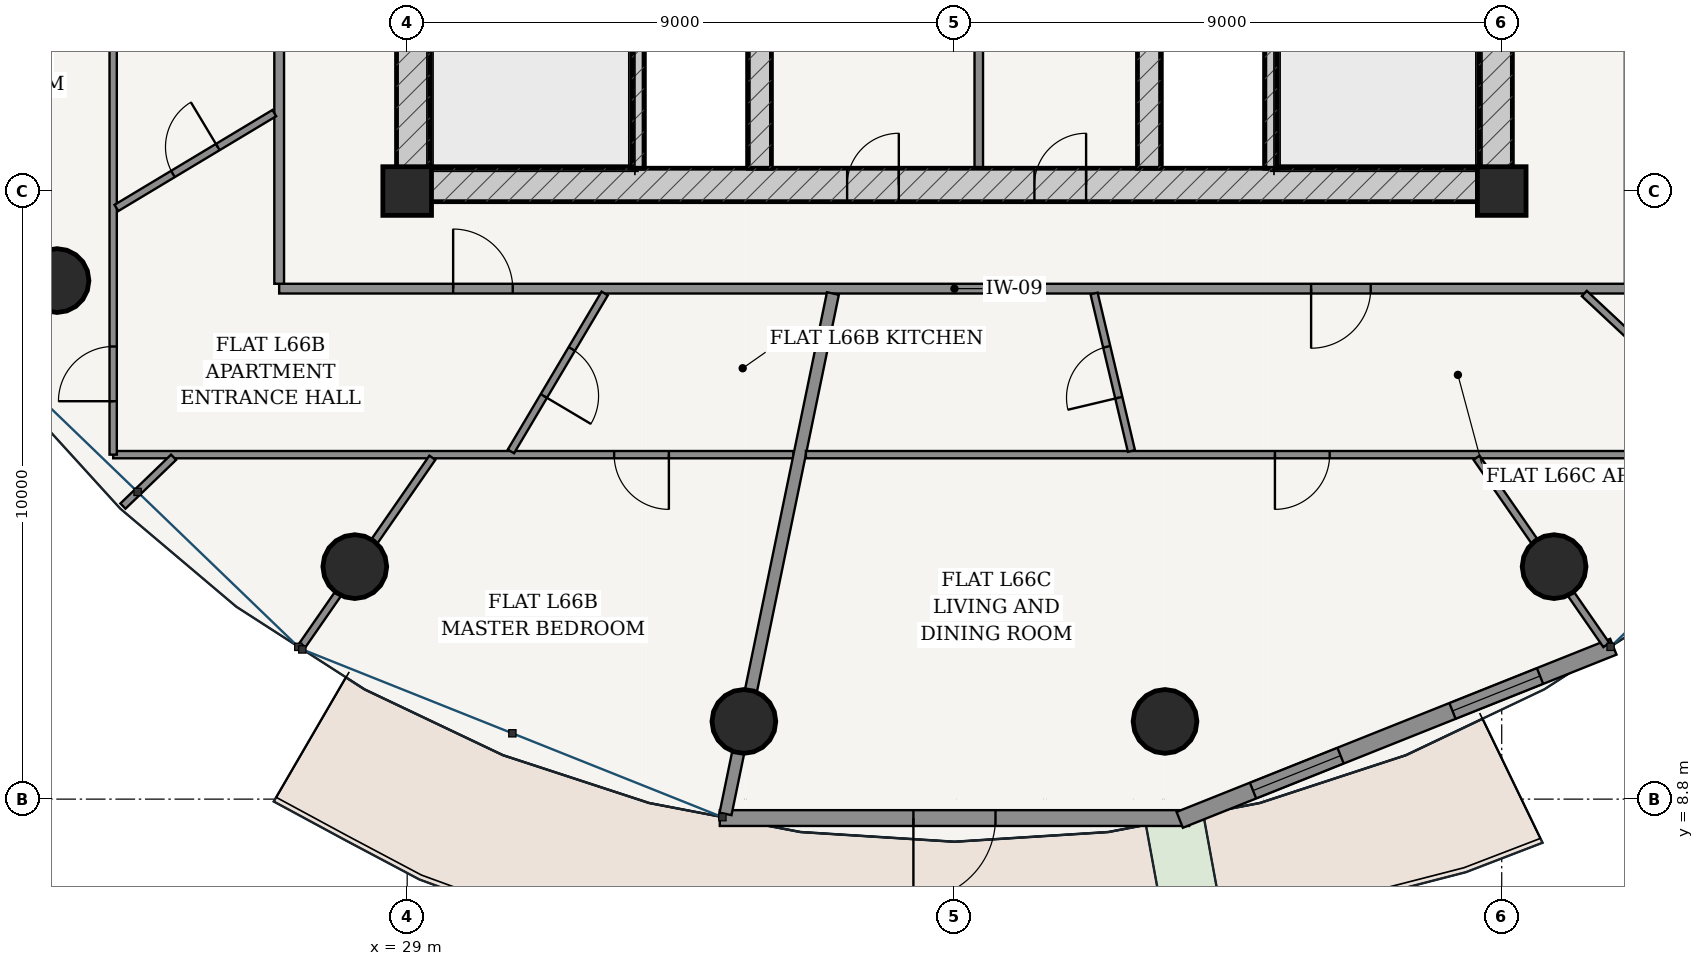
"""IFC4 building model, lengths in metres.
Left out: names, types, materials, properties, quantities, classifications, styles, units other than length and angle.
Written with IfcOpenShell. Run it as: python <this file> out.ifc"""

import sys

from ifc_helpers import new_model, si_unit, direction, frame, frame_2d, origin, origin_2d, place, context, subcontext, project, spatial, rectangle, hollow_circle, extrude, source, transform, mapped, element, fill, save


model = new_model("IFC4")
c1 = context("Model", 3, precision=1e-05, world=origin(), true_north=direction((-0.2419218956, 0.970295726276)))
c2 = subcontext(c1, "Body", "Model", "MODEL_VIEW")
j1 = project(units=[si_unit("LENGTHUNIT", "METRE"), si_unit("PLANEANGLEUNIT", "RADIAN")], contexts=[c1])
p1 = place(None, origin())
s1 = spatial("IfcSite", under=j1, at=p1, CompositionType="ELEMENT")
p2 = place(p1, origin())
s2 = spatial("IfcBuilding", under=s1, at=p2, CompositionType="ELEMENT")
p3 = place(p2, frame((0.0, 0.0, 251.95)))
s3 = spatial("IfcBuildingStorey", under=s2, at=p3, CompositionType="ELEMENT", Elevation=251.95)
for number, where, z_axis, x_axis in (
    (1, (29.0, 18.8, 0.0), (0.0, 0.0, 1.0), (1.0, 0.0, 0.0)),
    (2, (47.0, 18.8, 0.0), (0.0, 0.0, 1.0), (1.0, 0.0, 0.0)),
):
    element("IfcColumn", number, at=place(p3, frame(where, z_axis=z_axis, x_axis=x_axis)), inside=s3, PredefinedType="COLUMN", context=c2, shape_type="SweptSolid", body=[
        extrude(rectangle(XDim=0.8, YDim=0.8, at=origin_2d()), origin(), (0.0, 0.0, 1.0), 3.75),
    ])
p4 = place(p3, frame((28.825, 18.9, 0.0), z_axis=(0.0, 0.0, 1.0), x_axis=(1.0, 0.0, 0.0)))
e3 = element("IfcWall", 3, at=p4, inside=s3, PredefinedType="SHEAR", context=c2, shape_type="SweptSolid", body=[
    extrude(rectangle(XDim=18.35, YDim=0.55, at=frame_2d((9.175, 0.0))), origin(), (0.0, 0.0, 1.0), 3.49),
])
p5 = place(p4, frame((7.41, 0.0, 0.0)))
e4 = element("IfcOpeningElement", 4, at=p5, cuts=e3, PredefinedType="OPENING", context=c2, shape_type="SweptSolid", body=[
    extrude(rectangle(XDim=0.85, YDim=2.1, at=frame_2d((0.425, 1.05))), frame((0.0, 0.285, 0.0), z_axis=(0.0, -1.0, 0.0), x_axis=(1.0, 0.0, 0.0)), (0.0, 0.0, 1.0), 0.57),
])
p6 = place(p4, frame((10.49, 0.0, 0.0)))
e5 = element("IfcOpeningElement", 5, at=p6, cuts=e3, PredefinedType="OPENING", context=c2, shape_type="SweptSolid", body=[
    extrude(rectangle(XDim=0.85, YDim=2.1, at=frame_2d((0.425, 1.05))), frame((0.0, 0.285, 0.0), z_axis=(0.0, -1.0, 0.0), x_axis=(1.0, 0.0, 0.0)), (0.0, 0.0, 1.0), 0.57),
])
p7 = place(p3, frame((29.1, 19.175, 0.0), z_axis=(0.0, 0.0, 1.0), x_axis=(0.0, 1.0, 0.0)))
e6 = element("IfcWall", 6, at=p7, inside=s3, PredefinedType="SHEAR", context=c2, shape_type="SweptSolid", body=[
    extrude(rectangle(XDim=15.25, YDim=0.55, at=frame_2d((7.625, 0.0))), origin(), (0.0, 0.0, 1.0), 3.49),
])
p8 = place(p7, frame((9.875, 0.0, 0.0)))
e7 = element("IfcOpeningElement", 7, at=p8, cuts=e6, PredefinedType="OPENING", context=c2, shape_type="SweptSolid", body=[
    extrude(rectangle(XDim=1.5, YDim=2.2, at=frame_2d((0.75, 1.1))), frame((0.0, 0.285, 0.0), z_axis=(0.0, -1.0, 0.0), x_axis=(1.0, 0.0, 0.0)), (0.0, 0.0, 1.0), 0.57),
])
p9 = place(p3, frame((46.9, 19.175, 0.0), z_axis=(0.0, 0.0, 1.0), x_axis=(0.0, 1.0, 0.0)))
e8 = element("IfcWall", 8, at=p9, inside=s3, PredefinedType="SHEAR", context=c2, shape_type="SweptSolid", body=[
    extrude(rectangle(XDim=15.25, YDim=0.55, at=frame_2d((7.625, 0.0))), origin(), (0.0, 0.0, 1.0), 3.49),
])
p10 = place(p9, frame((9.875, 0.0, 0.0)))
e9 = element("IfcOpeningElement", 9, at=p10, cuts=e8, PredefinedType="OPENING", context=c2, shape_type="SweptSolid", body=[
    extrude(rectangle(XDim=1.5, YDim=2.2, at=frame_2d((0.75, 1.1))), frame((0.0, 0.285, 0.0), z_axis=(0.0, -1.0, 0.0), x_axis=(1.0, 0.0, 0.0)), (0.0, 0.0, 1.0), 0.57),
])
for number, where, z_axis, x_axis in (
    (10, (32.795, 19.175, 0.0), (0.0, 0.0, 1.0), (0.0, 1.0, 0.0)),
    (11, (43.205, 19.175, 0.0), (0.0, 0.0, 1.0), (0.0, 1.0, 0.0)),
):
    element("IfcWall", number, at=place(p3, frame(where, z_axis=z_axis, x_axis=x_axis)), inside=s3, PredefinedType="SOLIDWALL", context=c2, shape_type="SweptSolid", body=[
        extrude(rectangle(XDim=7.375, YDim=0.2, at=frame_2d((3.688, 0.0))), origin(), (0.0, 0.0, 1.0), 3.49),
    ])
p11 = place(p3, frame((34.8, 19.175, 0.0), z_axis=(0.0, 0.0, 1.0), x_axis=(0.0, 1.0, 0.0)))
e12 = element("IfcWall", 12, at=p11, inside=s3, PredefinedType="SHEAR", context=c2, shape_type="SweptSolid", body=[
    extrude(rectangle(XDim=15.25, YDim=0.38, at=frame_2d((7.625, 0.0))), origin(), (0.0, 0.0, 1.0), 3.49),
])
p12 = place(p11, frame((7.8, 0.0, 0.0)))
e13 = element("IfcOpeningElement", 13, at=p12, cuts=e12, PredefinedType="OPENING", context=c2, shape_type="SweptSolid", body=[
    extrude(rectangle(XDim=1.05, YDim=2.15, at=frame_2d((0.525, 1.075))), frame((0.0, 0.2, 0.0), z_axis=(0.0, -1.0, 0.0), x_axis=(1.0, 0.0, 0.0)), (0.0, 0.0, 1.0), 0.4),
])
p13 = place(p3, frame((41.2, 19.175, 0.0), z_axis=(0.0, 0.0, 1.0), x_axis=(0.0, 1.0, 0.0)))
e14 = element("IfcWall", 14, at=p13, inside=s3, PredefinedType="SHEAR", context=c2, shape_type="SweptSolid", body=[
    extrude(rectangle(XDim=15.25, YDim=0.38, at=frame_2d((7.625, 0.0))), origin(), (0.0, 0.0, 1.0), 3.49),
])
p14 = place(p13, frame((7.8, 0.0, 0.0)))
e15 = element("IfcOpeningElement", 15, at=p14, cuts=e14, PredefinedType="OPENING", context=c2, shape_type="SweptSolid", body=[
    extrude(rectangle(XDim=1.05, YDim=2.15, at=frame_2d((0.525, 1.075))), frame((0.0, 0.2, 0.0), z_axis=(0.0, -1.0, 0.0), x_axis=(1.0, 0.0, 0.0)), (0.0, 0.0, 1.0), 0.4),
])
for number, where, z_axis, x_axis in (
    (16, (23.241, 17.328, 0.0), (0.0, 0.0, 1.0), (1.0, 0.0, 0.0)),
    (17, (28.139, 12.624, 0.0), (0.0, 0.0, 1.0), (1.0, 0.0, 0.0)),
    (18, (34.537, 10.078, 0.0), (0.0, 0.0, 1.0), (1.0, 0.0, 0.0)),
    (19, (41.463, 10.078, 0.0), (0.0, 0.0, 1.0), (1.0, 0.0, 0.0)),
    (20, (47.861, 12.624, 0.0), (0.0, 0.0, 1.0), (1.0, 0.0, 0.0)),
):
    element("IfcColumn", number, at=place(p3, frame(where, z_axis=z_axis, x_axis=x_axis)), inside=s3, PredefinedType="COLUMN", context=c2, shape_type="SweptSolid", body=[
        extrude(hollow_circle(Radius=0.525, WallThickness=0.035, at=origin_2d()), origin(), (0.0, 0.0, 1.0), 3.75),
    ])
p15 = place(p3, frame((34.141, 8.489, 0.0), z_axis=(0.0, 0.0, 1.0), x_axis=(1.0, 0.0, 0.0)))
e21 = element("IfcWall", 21, at=p15, inside=s3, PredefinedType="SOLIDWALL", context=c2, shape_type="SweptSolid", body=[
    extrude(rectangle(XDim=7.718, YDim=0.26, at=frame_2d((3.859, 0.0))), origin(), (0.0, 0.0, 1.0), 3.49),
])
p16 = place(p15, frame((3.184, 0.0, 0.0)))
e22 = element("IfcOpeningElement", 22, at=p16, cuts=e21, PredefinedType="OPENING", context=c2, shape_type="SweptSolid", body=[
    extrude(rectangle(XDim=1.35, YDim=2.2, at=frame_2d((0.675, 1.1))), frame((0.0, 0.14, 0.0), z_axis=(0.0, -1.0, 0.0), x_axis=(1.0, 0.0, 0.0)), (0.0, 0.0, 1.0), 0.28),
])
p17 = place(p3, frame((41.705, 8.459, 0.0), z_axis=(0.0, 0.0, 1.0), x_axis=(0.92871332341, 0.370798547626, 0.0)))
e23 = element("IfcWall", 23, at=p17, inside=s3, PredefinedType="SOLIDWALL", context=c2, shape_type="SweptSolid", body=[
    extrude(rectangle(XDim=7.678, YDim=0.28, at=frame_2d((3.839, 0.0))), origin(), (0.0, 0.0, 1.0), 3.49),
])
p18 = place(p17, frame((1.298, 0.0, 0.85)))
e24 = element("IfcOpeningElement", 24, at=p18, cuts=e23, PredefinedType="OPENING", context=c2, shape_type="SweptSolid", body=[
    extrude(rectangle(XDim=1.55, YDim=1.95, at=frame_2d((0.775, 0.975))), frame((0.0, 0.15, 0.0), z_axis=(0.0, -1.0, 0.0), x_axis=(1.0, 0.0, 0.0)), (0.0, 0.0, 1.0), 0.3),
])
p19 = place(p17, frame((4.83, 0.0, 0.85)))
e25 = element("IfcOpeningElement", 25, at=p19, cuts=e23, PredefinedType="OPENING", context=c2, shape_type="SweptSolid", body=[
    extrude(rectangle(XDim=1.55, YDim=1.95, at=frame_2d((0.775, 0.975))), frame((0.0, 0.15, 0.0), z_axis=(0.0, -1.0, 0.0), x_axis=(1.0, 0.0, 0.0)), (0.0, 0.0, 1.0), 0.3),
])
p20 = place(p3, frame((38.4, 19.175, 0.0), z_axis=(0.0, 0.0, 1.0), x_axis=(0.0, 1.0, 0.0)))
e26 = element("IfcWall", 26, at=p20, inside=s3, PredefinedType="PARTITIONING", context=c2, shape_type="SweptSolid", body=[
    extrude(rectangle(XDim=4.465, YDim=0.14, at=frame_2d((2.232, 0.0))), origin(), (0.0, 0.0, 1.0), 3.49),
])
p21 = place(p3, frame((26.895, 17.195, 0.0), z_axis=(0.0, 0.0, 1.0), x_axis=(1.0, 0.0, 0.0)))
e27 = element("IfcWall", 27, at=p21, inside=s3, PredefinedType="PARTITIONING", context=c2, shape_type="SweptSolid", body=[
    extrude(rectangle(XDim=22.21, YDim=0.16, at=frame_2d((11.105, 0.0))), origin(), (0.0, 0.0, 1.0), 3.015),
])
p22 = place(p21, frame((2.861, 0.0, 0.0)))
e28 = element("IfcOpeningElement", 28, at=p22, cuts=e27, PredefinedType="OPENING", context=c2, shape_type="SweptSolid", body=[
    extrude(rectangle(XDim=0.98, YDim=2.2, at=frame_2d((0.49, 1.1))), frame((0.0, 0.09, 0.0), z_axis=(0.0, -1.0, 0.0), x_axis=(1.0, 0.0, 0.0)), (0.0, 0.0, 1.0), 0.18),
])
p23 = place(p21, frame((16.97, 0.0, 0.0)))
e29 = element("IfcOpeningElement", 29, at=p23, cuts=e27, PredefinedType="OPENING", context=c2, shape_type="SweptSolid", body=[
    extrude(rectangle(XDim=0.98, YDim=2.2, at=frame_2d((0.49, 1.1))), frame((0.0, 0.09, 0.0), z_axis=(0.0, -1.0, 0.0), x_axis=(1.0, 0.0, 0.0)), (0.0, 0.0, 1.0), 0.18),
])
for number, where, z_axis, x_axis in (
    (30, (26.895, 17.275, 0.0), (0.0, 0.0, 1.0), (0.0, 1.0, 0.0)),
    (31, (49.105, 17.275, 0.0), (0.0, 0.0, 1.0), (0.0, 1.0, 0.0)),
):
    element("IfcWall", number, at=place(p3, frame(where, z_axis=z_axis, x_axis=x_axis)), inside=s3, PredefinedType="PARTITIONING", context=c2, shape_type="SweptSolid", body=[
        extrude(rectangle(XDim=13.925, YDim=0.16, at=frame_2d((6.962, 0.0))), origin(), (0.0, 0.0, 1.0), 3.015),
    ])
p24 = place(p3, frame((35.353, 14.465, 0.0), z_axis=(0.0, 0.0, 1.0), x_axis=(-1.0, 0.0, 0.0)))
e32 = element("IfcWall", 32, at=p24, inside=s3, PredefinedType="PARTITIONING", context=c2, shape_type="SweptSolid", body=[
    extrude(rectangle(XDim=11.188, YDim=0.12, at=frame_2d((5.594, 0.0))), origin(), (0.0, 0.0, 1.0), 3.015),
])
p25 = place(p24, frame((2.049, 0.0, 0.0)))
e33 = element("IfcOpeningElement", 33, at=p25, cuts=e32, PredefinedType="OPENING", context=c2, shape_type="SweptSolid", body=[
    extrude(rectangle(XDim=0.9, YDim=2.15, at=frame_2d((0.45, 1.075))), frame((0.0, 0.07, 0.0), z_axis=(0.0, -1.0, 0.0), x_axis=(1.0, 0.0, 0.0)), (0.0, 0.0, 1.0), 0.14),
])
p26 = place(p3, frame((24.165, 14.465, 0.0), z_axis=(0.0, 0.0, 1.0), x_axis=(0.0, 1.0, 0.0)))
e34 = element("IfcWall", 34, at=p26, inside=s3, PredefinedType="PARTITIONING", context=c2, shape_type="SweptSolid", body=[
    extrude(rectangle(XDim=9.58, YDim=0.12, at=frame_2d((4.79, 0.0))), origin(), (0.0, 0.0, 1.0), 3.015),
])
p27 = place(p26, frame((0.879, 0.0, 0.0)))
e35 = element("IfcOpeningElement", 35, at=p27, cuts=e34, PredefinedType="OPENING", context=c2, shape_type="SweptSolid", body=[
    extrude(rectangle(XDim=0.9, YDim=2.15, at=frame_2d((0.45, 1.075))), frame((0.0, 0.07, 0.0), z_axis=(0.0, -1.0, 0.0), x_axis=(1.0, 0.0, 0.0)), (0.0, 0.0, 1.0), 0.14),
])
p28 = place(p3, frame((25.159, 14.422, 0.0), z_axis=(0.0, 0.0, 1.0), x_axis=(-0.720070222664, -0.693901199331, 0.0)))
e36 = element("IfcWall", 36, at=p28, inside=s3, PredefinedType="PARTITIONING", context=c2, shape_type="SweptSolid", body=[
    extrude(rectangle(XDim=1.157, YDim=0.12, at=frame_2d((0.578, 0.0))), origin(), (0.0, 0.0, 1.0), 3.49),
])
p29 = place(p3, frame((29.414, 14.414, 0.0), z_axis=(0.0, 0.0, 1.0), x_axis=(-0.569657021681, -0.821882520589, 0.0)))
e37 = element("IfcWall", 37, at=p29, inside=s3, PredefinedType="PARTITIONING", context=c2, shape_type="SweptSolid", body=[
    extrude(rectangle(XDim=3.748, YDim=0.12, at=frame_2d((1.874, 0.0))), origin(), (0.0, 0.0, 1.0), 3.015),
])
p30 = place(p3, frame((26.815, 20.082, 0.0), z_axis=(0.0, 0.0, 1.0), x_axis=(-0.857265264382, -0.514875000834, 0.0)))
e38 = element("IfcWall", 38, at=p30, inside=s3, PredefinedType="PARTITIONING", context=c2, shape_type="SweptSolid", body=[
    extrude(rectangle(XDim=3.029, YDim=0.12, at=frame_2d((1.515, 0.0))), origin(), (0.0, 0.0, 1.0), 3.209),
])
p31 = place(p30, frame((1.085, 0.0, 0.0)))
e39 = element("IfcOpeningElement", 39, at=p31, cuts=e38, PredefinedType="OPENING", context=c2, shape_type="SweptSolid", body=[
    extrude(rectangle(XDim=0.86, YDim=2.15, at=frame_2d((0.43, 1.075))), frame((0.0, 0.07, 0.0), z_axis=(0.0, -1.0, 0.0), x_axis=(1.0, 0.0, 0.0)), (0.0, 0.0, 1.0), 0.14),
])
p32 = place(p3, frame((32.248, 17.115, 0.0), z_axis=(0.0, 0.0, 1.0), x_axis=(-0.510591051721, -0.85982369001, 0.0)))
e40 = element("IfcWall", 40, at=p32, inside=s3, PredefinedType="PARTITIONING", context=c2, shape_type="SweptSolid", body=[
    extrude(rectangle(XDim=3.02, YDim=0.12, at=frame_2d((1.51, 0.0))), origin(), (0.0, 0.0, 1.0), 3.209),
])
p33 = place(p32, frame((1.06, 0.0, 0.0)))
e41 = element("IfcOpeningElement", 41, at=p33, cuts=e40, PredefinedType="OPENING", context=c2, shape_type="SweptSolid", body=[
    extrude(rectangle(XDim=0.9, YDim=2.15, at=frame_2d((0.45, 1.075))), frame((0.0, 0.07, 0.0), z_axis=(0.0, -1.0, 0.0), x_axis=(1.0, 0.0, 0.0)), (0.0, 0.0, 1.0), 0.14),
])
p34 = place(p3, frame((36.001, 17.115, 0.0), z_axis=(0.0, 0.0, 1.0), x_axis=(-0.202108543081, -0.979363128167, 0.0)))
e42 = element("IfcWall", 42, at=p34, inside=s3, PredefinedType="PARTITIONING", context=c2, shape_type="SweptSolid", body=[
    extrude(rectangle(XDim=8.739, YDim=0.2, at=frame_2d((4.369, 0.0))), origin(), (0.0, 0.0, 1.0), 3.015),
])
p35 = place(p3, frame((51.835, 14.465, 0.0), z_axis=(0.0, 0.0, 1.0), x_axis=(-1.0, 0.0, 0.0)))
e43 = element("IfcWall", 43, at=p35, inside=s3, PredefinedType="PARTITIONING", context=c2, shape_type="SweptSolid", body=[
    extrude(rectangle(XDim=16.278, YDim=0.12, at=frame_2d((8.139, 0.0))), origin(), (0.0, 0.0, 1.0), 3.015),
])
p36 = place(p35, frame((7.665, 0.0, 0.0)))
e44 = element("IfcOpeningElement", 44, at=p36, cuts=e43, PredefinedType="OPENING", context=c2, shape_type="SweptSolid", body=[
    extrude(rectangle(XDim=0.9, YDim=2.15, at=frame_2d((0.45, 1.075))), frame((0.0, 0.07, 0.0), z_axis=(0.0, -1.0, 0.0), x_axis=(1.0, 0.0, 0.0)), (0.0, 0.0, 1.0), 0.14),
])
p37 = place(p3, frame((46.586, 14.414, 0.0), z_axis=(0.0, 0.0, 1.0), x_axis=(0.569657021681, -0.821882520589, 0.0)))
e45 = element("IfcWall", 45, at=p37, inside=s3, PredefinedType="PARTITIONING", context=c2, shape_type="SweptSolid", body=[
    extrude(rectangle(XDim=3.748, YDim=0.12, at=frame_2d((1.874, 0.0))), origin(), (0.0, 0.0, 1.0), 3.015),
])
p38 = place(p3, frame((40.296, 17.115, 0.0), z_axis=(0.0, 0.0, 1.0), x_axis=(0.230710960444, -0.973022328999, 0.0)))
e46 = element("IfcWall", 46, at=p38, inside=s3, PredefinedType="PARTITIONING", context=c2, shape_type="SweptSolid", body=[
    extrude(rectangle(XDim=2.661, YDim=0.12, at=frame_2d((1.331, 0.0))), origin(), (0.0, 0.0, 1.0), 3.49),
])
p39 = place(p38, frame((0.901, 0.0, 0.0)))
e47 = element("IfcOpeningElement", 47, at=p39, cuts=e46, PredefinedType="OPENING", context=c2, shape_type="SweptSolid", body=[
    extrude(rectangle(XDim=0.86, YDim=2.15, at=frame_2d((0.43, 1.075))), frame((0.0, 0.07, 0.0), z_axis=(0.0, -1.0, 0.0), x_axis=(1.0, 0.0, 0.0)), (0.0, 0.0, 1.0), 0.14),
])
p40 = place(p3, frame((48.358, 17.115, 0.0), z_axis=(0.0, 0.0, 1.0), x_axis=(0.730431927487, -0.682985504464, 0.0)))
e48 = element("IfcWall", 48, at=p40, inside=s3, PredefinedType="PARTITIONING", context=c2, shape_type="SweptSolid", body=[
    extrude(rectangle(XDim=3.818, YDim=0.12, at=frame_2d((1.909, 0.0))), origin(), (0.0, 0.0, 1.0), 3.121),
])
p41 = place(p40, frame((1.459, 0.0, 0.0)))
e49 = element("IfcOpeningElement", 49, at=p41, cuts=e48, PredefinedType="OPENING", context=c2, shape_type="SweptSolid", body=[
    extrude(rectangle(XDim=0.9, YDim=2.15, at=frame_2d((0.45, 1.075))), frame((0.0, 0.07, 0.0), z_axis=(0.0, -1.0, 0.0), x_axis=(1.0, 0.0, 0.0)), (0.0, 0.0, 1.0), 0.14),
])
m1 = source(origin(), c2, "Body", "SweptSolid", [
    extrude(rectangle(XDim=1.35, YDim=2.2, at=frame_2d((0.675, 1.1))), frame((0.0, 0.025, 0.0), z_axis=(0.0, -1.0, 0.0), x_axis=(1.0, 0.0, 0.0)), (0.0, 0.0, 1.0), 0.05),
])
p42 = place(p16, frame((1.35, 0.0, 0.0), z_axis=(0.0, 0.0, 1.0), x_axis=(-1.0, 0.0, 0.0)))
e50 = element("IfcDoor", 50, at=p42, inside=s3, OperationType="SINGLE_SWING_RIGHT", PredefinedType="DOOR", context=c2, shape_type="MappedRepresentation", body=[
    mapped(m1, transform((0.0, 0.0, 0.0), scale=1.0)),
])
fill(e22, e50)
m2 = source(origin(), c2, "Body", "SweptSolid", [
    extrude(rectangle(XDim=1.55, YDim=1.95, at=frame_2d((0.775, 0.975))), frame((0.0, 0.03, 0.0), z_axis=(0.0, -1.0, 0.0), x_axis=(1.0, 0.0, 0.0)), (0.0, 0.0, 1.0), 0.06),
])
p43 = place(p18, origin())
e51 = element("IfcWindow", 51, at=p43, inside=s3, PartitioningType="SINGLE_PANEL", PredefinedType="WINDOW", context=c2, shape_type="MappedRepresentation", body=[
    mapped(m2, transform((0.0, 0.0, 0.0), scale=1.0)),
])
fill(e24, e51)
p44 = place(p19, origin())
e52 = element("IfcWindow", 52, at=p44, inside=s3, PartitioningType="SINGLE_PANEL", PredefinedType="WINDOW", context=c2, shape_type="MappedRepresentation", body=[
    mapped(m2, transform((0.0, 0.0, 0.0), scale=1.0)),
])
fill(e25, e52)
m3 = source(origin(), c2, "Body", "SweptSolid", [
    extrude(rectangle(XDim=0.85, YDim=2.1, at=frame_2d((0.425, 1.05))), frame((0.0, 0.025, 0.0), z_axis=(0.0, -1.0, 0.0), x_axis=(1.0, 0.0, 0.0)), (0.0, 0.0, 1.0), 0.05),
])
p45 = place(p5, origin())
e53 = element("IfcDoor", 53, at=p45, inside=s3, OperationType="SINGLE_SWING_RIGHT", PredefinedType="DOOR", context=c2, shape_type="MappedRepresentation", body=[
    mapped(m3, transform((0.0, 0.0, 0.0), scale=1.0)),
])
fill(e4, e53)
p46 = place(p6, origin())
e54 = element("IfcDoor", 54, at=p46, inside=s3, OperationType="SINGLE_SWING_RIGHT", PredefinedType="DOOR", context=c2, shape_type="MappedRepresentation", body=[
    mapped(m3, transform((0.0, 0.0, 0.0), scale=1.0)),
])
fill(e5, e54)
m4 = source(origin(), c2, "Body", "SweptSolid", [
    extrude(rectangle(XDim=0.98, YDim=2.2, at=frame_2d((0.49, 1.1))), frame((0.0, 0.025, 0.0), z_axis=(0.0, -1.0, 0.0), x_axis=(1.0, 0.0, 0.0)), (0.0, 0.0, 1.0), 0.05),
])
p47 = place(p22, origin())
e55 = element("IfcDoor", 55, at=p47, inside=s3, OperationType="SINGLE_SWING_LEFT", PredefinedType="DOOR", context=c2, shape_type="MappedRepresentation", body=[
    mapped(m4, transform((0.0, 0.0, 0.0), scale=1.0)),
])
fill(e28, e55)
m5 = source(origin(), c2, "Body", "SweptSolid", [
    extrude(rectangle(XDim=0.86, YDim=2.15, at=frame_2d((0.43, 1.075))), frame((0.0, 0.025, 0.0), z_axis=(0.0, -1.0, 0.0), x_axis=(1.0, 0.0, 0.0)), (0.0, 0.0, 1.0), 0.05),
])
p48 = place(p31, frame((0.86, 0.0, 0.0), z_axis=(0.0, 0.0, 1.0), x_axis=(-1.0, 0.0, 0.0)))
e56 = element("IfcDoor", 56, at=p48, inside=s3, OperationType="SINGLE_SWING_RIGHT", PredefinedType="DOOR", context=c2, shape_type="MappedRepresentation", body=[
    mapped(m5, transform((0.0, 0.0, 0.0), scale=1.0)),
])
fill(e39, e56)
m6 = source(origin(), c2, "Body", "SweptSolid", [
    extrude(rectangle(XDim=0.9, YDim=2.15, at=frame_2d((0.45, 1.075))), frame((0.0, 0.025, 0.0), z_axis=(0.0, -1.0, 0.0), x_axis=(1.0, 0.0, 0.0)), (0.0, 0.0, 1.0), 0.05),
])
p49 = place(p27, origin())
e57 = element("IfcDoor", 57, at=p49, inside=s3, OperationType="SINGLE_SWING_LEFT", PredefinedType="DOOR", context=c2, shape_type="MappedRepresentation", body=[
    mapped(m6, transform((0.0, 0.0, 0.0), scale=1.0)),
])
fill(e35, e57)
p50 = place(p33, origin())
e58 = element("IfcDoor", 58, at=p50, inside=s3, OperationType="SINGLE_SWING_RIGHT", PredefinedType="DOOR", context=c2, shape_type="MappedRepresentation", body=[
    mapped(m6, transform((0.0, 0.0, 0.0), scale=1.0)),
])
fill(e41, e58)
p51 = place(p25, origin())
e59 = element("IfcDoor", 59, at=p51, inside=s3, OperationType="SINGLE_SWING_LEFT", PredefinedType="DOOR", context=c2, shape_type="MappedRepresentation", body=[
    mapped(m6, transform((0.0, 0.0, 0.0), scale=1.0)),
])
fill(e33, e59)
p52 = place(p23, frame((0.98, 0.0, 0.0), z_axis=(0.0, 0.0, 1.0), x_axis=(-1.0, 0.0, 0.0)))
e60 = element("IfcDoor", 60, at=p52, inside=s3, OperationType="SINGLE_SWING_RIGHT", PredefinedType="DOOR", context=c2, shape_type="MappedRepresentation", body=[
    mapped(m4, transform((0.0, 0.0, 0.0), scale=1.0)),
])
fill(e29, e60)
p53 = place(p39, frame((0.86, 0.0, 0.0), z_axis=(0.0, 0.0, 1.0), x_axis=(-1.0, 0.0, 0.0)))
e61 = element("IfcDoor", 61, at=p53, inside=s3, OperationType="SINGLE_SWING_LEFT", PredefinedType="DOOR", context=c2, shape_type="MappedRepresentation", body=[
    mapped(m5, transform((0.0, 0.0, 0.0), scale=1.0)),
])
fill(e47, e61)
p54 = place(p36, origin())
e62 = element("IfcDoor", 62, at=p54, inside=s3, OperationType="SINGLE_SWING_RIGHT", PredefinedType="DOOR", context=c2, shape_type="MappedRepresentation", body=[
    mapped(m6, transform((0.0, 0.0, 0.0), scale=1.0)),
])
fill(e44, e62)
save(model, sys.argv[1])
